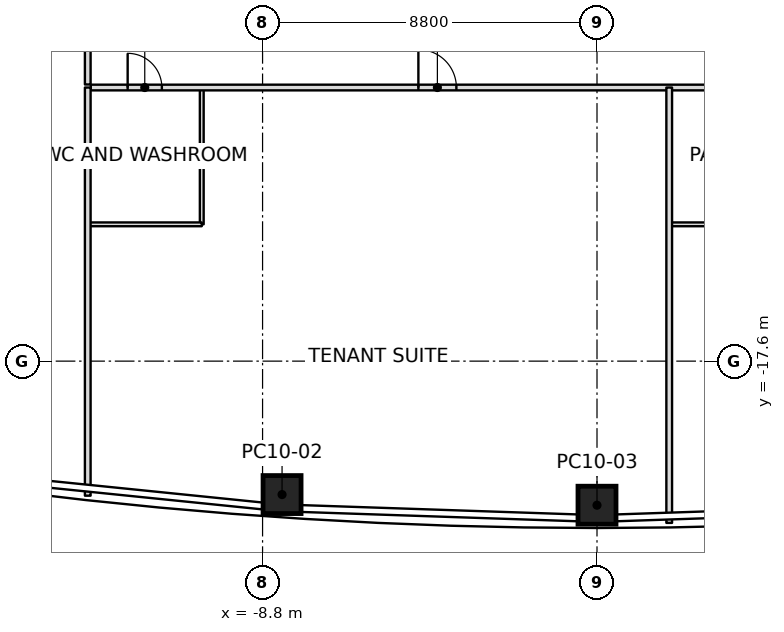
"""IFC4 building model, lengths in metres.
Left out: names, types, materials, properties, quantities, classifications, styles, units other than length and angle.
Written with IfcOpenShell. Run it as: python <this file> out.ifc"""

import sys

from ifc_helpers import new_model, si_unit, direction, frame, frame_2d, origin, origin_2d, place, context, subcontext, project, spatial, rectangle, extrude, element, fill, save


model = new_model("IFC4")
c1 = context("Model", 3, precision=1e-05, world=origin(), true_north=direction((0.0, 1.0)))
c2 = subcontext(c1, "Body", "Model", "MODEL_VIEW")
j1 = project(units=[si_unit("LENGTHUNIT", "METRE"), si_unit("PLANEANGLEUNIT", "RADIAN")], contexts=[c1])
p1 = place(None, origin())
s1 = spatial("IfcSite", under=j1, at=p1, CompositionType="ELEMENT")
p2 = place(p1, origin())
s2 = spatial("IfcBuilding", under=s1, at=p2, CompositionType="ELEMENT")
p3 = place(p2, frame((0.0, 0.0, 177.8)))
s3 = spatial("IfcBuildingStorey", under=s2, at=p3, CompositionType="ELEMENT", Elevation=177.8)
p4 = place(p3, frame((-8.287, -21.111, 0.0), z_axis=(0.008849199152, 0.01116829962, 0.999898475225), x_axis=(-0.99768068915, 0.067587294423, 0.008074659732)))
e1 = element("IfcColumn", 1, at=p4, inside=s3, PredefinedType="COLUMN", context=c2, shape_type="SweptSolid", body=[
    extrude(rectangle(XDim=1.0, YDim=1.0, at=origin_2d()), origin(), (0.0, 0.0, 1.0), 4.0),
])
p5 = place(p3, frame((0.0, -21.391, 0.0), z_axis=(0.0, 0.01141283087, 0.999934871525), x_axis=(1.0, 0.0, 0.0)))
e2 = element("IfcColumn", 2, at=p5, inside=s3, PredefinedType="COLUMN", context=c2, shape_type="SweptSolid", body=[
    extrude(rectangle(XDim=1.0, YDim=1.0, at=origin_2d()), origin(), (0.0, 0.0, 1.0), 4.0),
])
p6 = place(p3, frame((-13.4, -10.4, 0.0), z_axis=(0.0, 0.0, 1.0), x_axis=(0.0, -1.0, 0.0)))
e3 = element("IfcWall", 3, at=p6, inside=s3, PredefinedType="PARTITIONING", context=c2, shape_type="SweptSolid", body=[
    extrude(rectangle(XDim=10.741, YDim=0.15, at=frame_2d((5.37, 0.0))), origin(), (0.0, 0.0, 1.0), 3.234),
])
p7 = place(p3, frame((1.9, -10.4, 0.0), z_axis=(0.0, 0.0, 1.0), x_axis=(0.0, -1.0, 0.0)))
e4 = element("IfcWall", 4, at=p7, inside=s3, PredefinedType="PARTITIONING", context=c2, shape_type="SweptSolid", body=[
    extrude(rectangle(XDim=11.457, YDim=0.15, at=frame_2d((5.729, 0.0))), origin(), (0.0, 0.0, 1.0), 3.234),
])
p8 = place(p3, frame((-13.4, 10.32, 0.0), z_axis=(0.0, 0.0, 1.0), x_axis=(0.0, -1.0, 0.0)))
e5 = element("IfcWall", 5, at=p8, inside=s3, PredefinedType="PARTITIONING", context=c2, shape_type="SweptSolid", body=[
    extrude(rectangle(XDim=20.64, YDim=0.15, at=frame_2d((10.32, 0.0))), origin(), (0.0, 0.0, 1.0), 3.166),
])
p9 = place(p8, frame((3.32, 0.0, 0.0)))
e6 = element("IfcOpeningElement", 6, at=p9, cuts=e5, PredefinedType="OPENING", context=c2, shape_type="SweptSolid", body=[
    extrude(rectangle(XDim=1.0, YDim=2.1, at=frame_2d((0.5, 1.05))), frame((0.0, 0.075, 0.0), z_axis=(0.0, -1.0, 0.0), x_axis=(1.0, 0.0, 0.0)), (0.0, 0.0, 1.0), 0.15),
])
p10 = place(p8, frame((9.77, 0.0, 0.0)))
e7 = element("IfcOpeningElement", 7, at=p10, cuts=e5, PredefinedType="OPENING", context=c2, shape_type="SweptSolid", body=[
    extrude(rectangle(XDim=0.9, YDim=2.1, at=frame_2d((0.45, 1.05))), frame((0.0, 0.075, 0.0), z_axis=(0.0, -1.0, 0.0), x_axis=(1.0, 0.0, 0.0)), (0.0, 0.0, 1.0), 0.15),
])
p11 = place(p8, frame((16.28, 0.0, 0.0)))
e8 = element("IfcOpeningElement", 8, at=p11, cuts=e5, PredefinedType="OPENING", context=c2, shape_type="SweptSolid", body=[
    extrude(rectangle(XDim=1.0, YDim=2.1, at=frame_2d((0.5, 1.05))), frame((0.0, 0.075, 0.0), z_axis=(0.0, -1.0, 0.0), x_axis=(1.0, 0.0, 0.0)), (0.0, 0.0, 1.0), 0.15),
])
p12 = place(p3, frame((-13.32, -10.4, 0.0), z_axis=(0.0, 0.0, 1.0), x_axis=(1.0, 0.0, 0.0)))
e9 = element("IfcWall", 9, at=p12, inside=s3, PredefinedType="PARTITIONING", context=c2, shape_type="SweptSolid", body=[
    extrude(rectangle(XDim=26.64, YDim=0.15, at=frame_2d((13.32, 0.0))), origin(), (0.0, 0.0, 1.0), 3.317),
])
p13 = place(p12, frame((0.97, 0.0, 0.0)))
e10 = element("IfcOpeningElement", 10, at=p13, cuts=e9, PredefinedType="OPENING", context=c2, shape_type="SweptSolid", body=[
    extrude(rectangle(XDim=0.9, YDim=2.1, at=frame_2d((0.45, 1.05))), frame((0.0, 0.075, 0.0), z_axis=(0.0, -1.0, 0.0), x_axis=(1.0, 0.0, 0.0)), (0.0, 0.0, 1.0), 0.15),
])
p14 = place(p12, frame((8.62, 0.0, 0.0)))
e11 = element("IfcOpeningElement", 11, at=p14, cuts=e9, PredefinedType="OPENING", context=c2, shape_type="SweptSolid", body=[
    extrude(rectangle(XDim=1.0, YDim=2.1, at=frame_2d((0.5, 1.05))), frame((0.0, 0.075, 0.0), z_axis=(0.0, -1.0, 0.0), x_axis=(1.0, 0.0, 0.0)), (0.0, 0.0, 1.0), 0.15),
])
p15 = place(p12, frame((16.27, 0.0, 0.0)))
e12 = element("IfcOpeningElement", 12, at=p15, cuts=e9, PredefinedType="OPENING", context=c2, shape_type="SweptSolid", body=[
    extrude(rectangle(XDim=0.9, YDim=2.1, at=frame_2d((0.45, 1.05))), frame((0.0, 0.075, 0.0), z_axis=(0.0, -1.0, 0.0), x_axis=(1.0, 0.0, 0.0)), (0.0, 0.0, 1.0), 0.15),
])
p16 = place(p12, frame((22.02, 0.0, 0.0)))
e13 = element("IfcOpeningElement", 13, at=p16, cuts=e9, PredefinedType="OPENING", context=c2, shape_type="SweptSolid", body=[
    extrude(rectangle(XDim=1.0, YDim=2.1, at=frame_2d((0.5, 1.05))), frame((0.0, 0.075, 0.0), z_axis=(0.0, -1.0, 0.0), x_axis=(1.0, 0.0, 0.0)), (0.0, 0.0, 1.0), 0.15),
])
p17 = place(p3, frame((-10.4, -10.43, 0.0), z_axis=(0.0, 0.0, 1.0), x_axis=(0.0, -1.0, 0.0)))
e14 = element("IfcWall", 14, at=p17, inside=s3, PredefinedType="PARTITIONING", context=c2, shape_type="SweptSolid", body=[
    extrude(rectangle(XDim=3.57, YDim=0.1, at=frame_2d((1.785, 0.0))), origin(), (0.0, 0.0, 1.0), 3.45),
])
p18 = place(p3, frame((-10.4, -14.0, 0.0), z_axis=(0.0, 0.0, 1.0), x_axis=(-1.0, 0.0, 0.0)))
e15 = element("IfcWall", 15, at=p18, inside=s3, PredefinedType="PARTITIONING", context=c2, shape_type="SweptSolid", body=[
    extrude(rectangle(XDim=2.97, YDim=0.1, at=frame_2d((1.485, 0.0))), origin(), (0.0, 0.0, 1.0), 3.393),
])
p19 = place(p3, frame((4.9, -14.0, 0.0), z_axis=(0.0, 0.0, 1.0), x_axis=(-1.0, 0.0, 0.0)))
e16 = element("IfcWall", 16, at=p19, inside=s3, PredefinedType="PARTITIONING", context=c2, shape_type="SweptSolid", body=[
    extrude(rectangle(XDim=2.97, YDim=0.1, at=frame_2d((1.485, 0.0))), origin(), (0.0, 0.0, 1.0), 3.317),
])
p20 = place(p13, origin())
e17 = element("IfcDoor", 17, at=p20, inside=s3, OperationType="SINGLE_SWING_RIGHT", PredefinedType="DOOR", context=c2, shape_type="SweptSolid", body=[
    extrude(rectangle(XDim=0.9, YDim=2.1, at=frame_2d((0.45, 1.05))), frame((0.0, 0.025, 0.0), z_axis=(0.0, -1.0, 0.0), x_axis=(1.0, 0.0, 0.0)), (0.0, 0.0, 1.0), 0.05),
])
fill(e10, e17)
p21 = place(p14, origin())
e18 = element("IfcDoor", 18, at=p21, inside=s3, OperationType="SINGLE_SWING_RIGHT", PredefinedType="DOOR", context=c2, shape_type="SweptSolid", body=[
    extrude(rectangle(XDim=1.0, YDim=2.1, at=frame_2d((0.5, 1.05))), frame((0.0, 0.025, 0.0), z_axis=(0.0, -1.0, 0.0), x_axis=(1.0, 0.0, 0.0)), (0.0, 0.0, 1.0), 0.05),
])
fill(e11, e18)
save(model, sys.argv[1])
